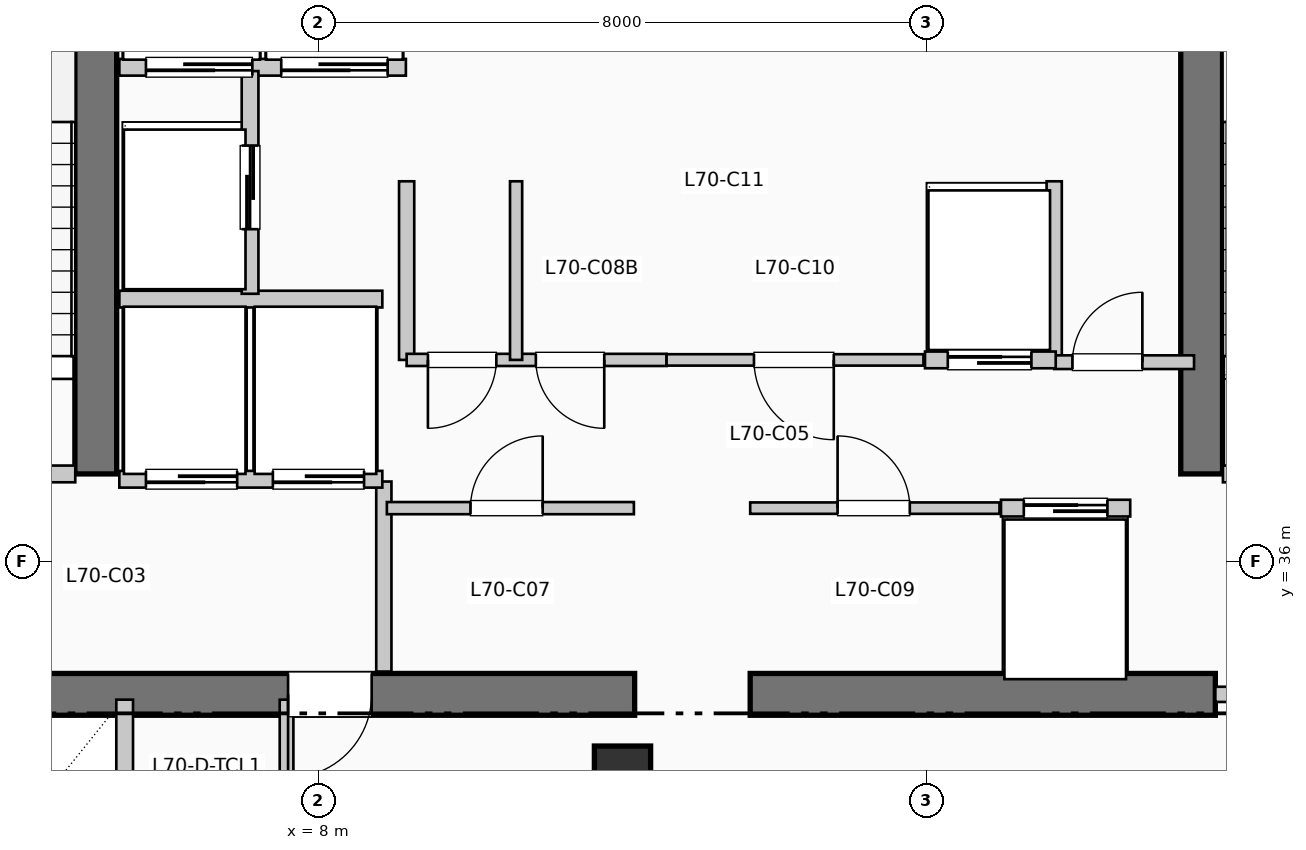
"""IFC4 building model, lengths in metres.
Left out: names, types, materials, properties, quantities, classifications, styles, units other than length and angle.
Written with IfcOpenShell. Run it as: python <this file> out.ifc"""

import sys

from ifc_helpers import new_model, si_unit, direction, frame, frame_2d, origin, origin_2d, place, context, subcontext, project, spatial, rectangle, extrude, element, fill, save


model = new_model("IFC4")
c1 = context("Model", 3, precision=1e-05, world=origin(), true_north=direction((0.0, 1.0)))
c2 = subcontext(c1, "Body", "Model", "MODEL_VIEW")
j1 = project(units=[si_unit("LENGTHUNIT", "METRE"), si_unit("PLANEANGLEUNIT", "RADIAN")], contexts=[c1])
p1 = place(None, origin())
s1 = spatial("IfcSite", under=j1, at=p1, CompositionType="ELEMENT")
p2 = place(p1, origin())
s2 = spatial("IfcBuilding", under=s1, at=p2, CompositionType="ELEMENT")
p3 = place(p2, frame((0.0, 0.0, 288.09)))
s3 = spatial("IfcBuildingStorey", under=s2, at=p3, CompositionType="ELEMENT", Elevation=288.09)
p4 = place(p3, frame((1.45, 34.25, 0.0), z_axis=(0.0, 0.0, 1.0), x_axis=(1.0, 0.0, 0.0)))
e1 = element("IfcWall", 1, at=p4, inside=s3, PredefinedType="SHEAR", context=c2, shape_type="SweptSolid", body=[
    extrude(rectangle(XDim=10.71, YDim=0.55, at=frame_2d((5.355, 0.0))), origin(), (0.0, 0.0, 1.0), 3.96),
])
p5 = place(p4, frame((7.25, 0.0, 0.0), z_axis=(0.0, 0.0, 1.0), x_axis=(-1.0, 0.0, 0.0)))
e2 = element("IfcOpeningElement", 2, at=p5, cuts=e1, PredefinedType="OPENING", context=c2, shape_type="SweptSolid", body=[
    extrude(rectangle(XDim=1.1, YDim=2.15, at=frame_2d((0.55, 1.075))), frame((0.0, 0.285, 0.0), z_axis=(0.0, -1.0, 0.0), x_axis=(1.0, 0.0, 0.0)), (0.0, 0.0, 1.0), 0.57),
])
p6 = place(p3, frame((13.68, 34.25, 0.0), z_axis=(0.0, 0.0, 1.0), x_axis=(1.0, 0.0, 0.0)))
e3 = element("IfcWall", 3, at=p6, inside=s3, PredefinedType="SHEAR", context=c2, shape_type="SweptSolid", body=[
    extrude(rectangle(XDim=6.12, YDim=0.55, at=frame_2d((3.06, 0.0))), origin(), (0.0, 0.0, 1.0), 3.96),
])
for number, where, z_axis, x_axis in (
    (4, (5.07, 37.15, 0.0), (0.0, 0.0, 1.0), (0.0, 1.0, 0.0)),
    (5, (19.62, 37.15, 0.0), (0.0, 0.0, 1.0), (0.0, 1.0, 0.0)),
):
    element("IfcWall", number, at=place(p3, frame(where, z_axis=z_axis, x_axis=x_axis)), inside=s3, PredefinedType="SHEAR", context=c2, shape_type="SweptSolid", body=[
        extrude(rectangle(XDim=7.89, YDim=0.55, at=frame_2d((3.945, 0.0))), origin(), (0.0, 0.0, 1.0), 3.96),
    ])
p7 = place(p3, frame((12.0, 33.2, 0.0), z_axis=(0.0, 0.0, 1.0), x_axis=(1.0, 0.0, 0.0)))
e6 = element("IfcColumn", 6, at=p7, inside=s3, PredefinedType="COLUMN", context=c2, shape_type="SweptSolid", body=[
    extrude(rectangle(XDim=0.74, YDim=0.74, at=origin_2d()), origin(), (0.0, 0.0, 1.0), 3.96),
])
p8 = place(p3, frame((1.65, 37.15, 0.0), z_axis=(0.0, 0.0, 1.0), x_axis=(1.0, 0.0, 0.0)))
e7 = element("IfcWall", 7, at=p8, inside=s3, PredefinedType="PARTITIONING", context=c2, shape_type="SweptSolid", body=[
    extrude(rectangle(XDim=3.15, YDim=0.22, at=frame_2d((1.575, 0.0))), origin(), (0.0, 0.0, 1.0), 3.74),
])
p9 = place(p8, frame((2.05, 0.0, 0.0), z_axis=(0.0, 0.0, 1.0), x_axis=(-1.0, 0.0, 0.0)))
e8 = element("IfcOpeningElement", 8, at=p9, cuts=e7, PredefinedType="OPENING", context=c2, shape_type="SweptSolid", body=[
    extrude(rectangle(XDim=1.05, YDim=2.15, at=frame_2d((0.525, 1.075))), frame((0.0, 0.12, 0.0), z_axis=(0.0, -1.0, 0.0), x_axis=(1.0, 0.0, 0.0)), (0.0, 0.0, 1.0), 0.24),
])
p10 = place(p3, frame((8.86, 34.55, 0.0), z_axis=(0.0, 0.0, 1.0), x_axis=(0.0, 1.0, 0.0)))
e9 = element("IfcWall", 9, at=p10, inside=s3, PredefinedType="PARTITIONING", context=c2, shape_type="SweptSolid", body=[
    extrude(rectangle(XDim=2.5, YDim=0.2, at=frame_2d((1.25, 0.0))), origin(), (0.0, 0.0, 1.0), 3.74),
])
p11 = place(p3, frame((19.9, 37.15, 0.0), z_axis=(0.0, 0.0, 1.0), x_axis=(1.0, 0.0, 0.0)))
e10 = element("IfcWall", 10, at=p11, inside=s3, PredefinedType="PARTITIONING", context=c2, shape_type="SweptSolid", body=[
    extrude(rectangle(XDim=3.15, YDim=0.22, at=frame_2d((1.575, 0.0))), origin(), (0.0, 0.0, 1.0), 3.74),
])
p12 = place(p11, frame((2.05, 0.0, 0.0), z_axis=(0.0, 0.0, 1.0), x_axis=(-1.0, 0.0, 0.0)))
e11 = element("IfcOpeningElement", 11, at=p12, cuts=e10, PredefinedType="OPENING", context=c2, shape_type="SweptSolid", body=[
    extrude(rectangle(XDim=1.05, YDim=2.15, at=frame_2d((0.525, 1.075))), frame((0.0, 0.12, 0.0), z_axis=(0.0, -1.0, 0.0), x_axis=(1.0, 0.0, 0.0)), (0.0, 0.0, 1.0), 0.24),
])
p13 = place(p3, frame((19.8, 34.25, 0.0), z_axis=(0.0, 0.0, 1.0), x_axis=(1.0, 0.0, 0.0)))
e12 = element("IfcWall", 12, at=p13, inside=s3, PredefinedType="PARTITIONING", context=c2, shape_type="SweptSolid", body=[
    extrude(rectangle(XDim=3.25, YDim=0.2, at=frame_2d((1.625, 0.0))), origin(), (0.0, 0.0, 1.0), 3.74),
])
p14 = place(p13, frame((2.15, 0.0, 0.0), z_axis=(0.0, 0.0, 1.0), x_axis=(-1.0, 0.0, 0.0)))
e13 = element("IfcOpeningElement", 13, at=p14, cuts=e12, PredefinedType="OPENING", context=c2, shape_type="SweptSolid", body=[
    extrude(rectangle(XDim=1.1, YDim=2.15, at=frame_2d((0.55, 1.075))), frame((0.0, 0.11, 0.0), z_axis=(0.0, -1.0, 0.0), x_axis=(1.0, 0.0, 0.0)), (0.0, 0.0, 1.0), 0.22),
])
p15 = place(p3, frame((5.38, 37.08, 0.0), z_axis=(0.0, 0.0, 1.0), x_axis=(1.0, 0.0, 0.0)))
e14 = element("IfcWall", 14, at=p15, inside=s3, PredefinedType="PARTITIONING", context=c2, shape_type="SweptSolid", body=[
    extrude(rectangle(XDim=3.46, YDim=0.22, at=frame_2d((1.73, 0.0))), origin(), (0.0, 0.0, 1.0), 3.74),
])
p16 = place(p15, frame((1.55, 0.0, 0.0), z_axis=(0.0, 0.0, 1.0), x_axis=(-1.0, 0.0, 0.0)))
e15 = element("IfcOpeningElement", 15, at=p16, cuts=e14, PredefinedType="OPENING", context=c2, shape_type="SweptSolid", body=[
    extrude(rectangle(XDim=1.2, YDim=2.2, at=frame_2d((0.6, 1.1))), frame((0.0, 0.12, 0.0), z_axis=(0.0, -1.0, 0.0), x_axis=(1.0, 0.0, 0.0)), (0.0, 0.0, 1.0), 0.24),
])
p17 = place(p15, frame((3.22, 0.0, 0.0), z_axis=(0.0, 0.0, 1.0), x_axis=(-1.0, 0.0, 0.0)))
e16 = element("IfcOpeningElement", 16, at=p17, cuts=e14, PredefinedType="OPENING", context=c2, shape_type="SweptSolid", body=[
    extrude(rectangle(XDim=1.2, YDim=2.2, at=frame_2d((0.6, 1.1))), frame((0.0, 0.12, 0.0), z_axis=(0.0, -1.0, 0.0), x_axis=(1.0, 0.0, 0.0)), (0.0, 0.0, 1.0), 0.24),
])
p18 = place(p3, frame((5.38, 39.45, 0.0), z_axis=(0.0, 0.0, 1.0), x_axis=(1.0, 0.0, 0.0)))
e17 = element("IfcWall", 17, at=p18, inside=s3, PredefinedType="PARTITIONING", context=c2, shape_type="SweptSolid", body=[
    extrude(rectangle(XDim=3.46, YDim=0.22, at=frame_2d((1.73, 0.0))), origin(), (0.0, 0.0, 1.0), 3.74),
])
p19 = place(p3, frame((5.38, 42.5, 0.0), z_axis=(0.0, 0.0, 1.0), x_axis=(1.0, 0.0, 0.0)))
e18 = element("IfcWall", 18, at=p19, inside=s3, PredefinedType="PARTITIONING", context=c2, shape_type="SweptSolid", body=[
    extrude(rectangle(XDim=3.77, YDim=0.22, at=frame_2d((1.885, 0.0))), origin(), (0.0, 0.0, 1.0), 3.74),
])
p20 = place(p19, frame((1.75, 0.0, 0.0), z_axis=(0.0, 0.0, 1.0), x_axis=(-1.0, 0.0, 0.0)))
e19 = element("IfcOpeningElement", 19, at=p20, cuts=e18, PredefinedType="OPENING", context=c2, shape_type="SweptSolid", body=[
    extrude(rectangle(XDim=1.4, YDim=2.2, at=frame_2d((0.7, 1.1))), frame((0.0, 0.12, 0.0), z_axis=(0.0, -1.0, 0.0), x_axis=(1.0, 0.0, 0.0)), (0.0, 0.0, 1.0), 0.24),
])
p21 = place(p19, frame((3.53, 0.0, 0.0), z_axis=(0.0, 0.0, 1.0), x_axis=(-1.0, 0.0, 0.0)))
e20 = element("IfcOpeningElement", 20, at=p21, cuts=e18, PredefinedType="OPENING", context=c2, shape_type="SweptSolid", body=[
    extrude(rectangle(XDim=1.4, YDim=2.2, at=frame_2d((0.7, 1.1))), frame((0.0, 0.12, 0.0), z_axis=(0.0, -1.0, 0.0), x_axis=(1.0, 0.0, 0.0)), (0.0, 0.0, 1.0), 0.24),
])
p22 = place(p3, frame((7.1, 39.52, 0.0), z_axis=(0.0, 0.0, 1.0), x_axis=(0.0, 1.0, 0.0)))
e21 = element("IfcWall", 21, at=p22, inside=s3, PredefinedType="PARTITIONING", context=c2, shape_type="SweptSolid", body=[
    extrude(rectangle(XDim=2.93, YDim=0.22, at=frame_2d((1.465, 0.0))), origin(), (0.0, 0.0, 1.0), 3.74),
])
p23 = place(p22, frame((0.85, 0.0, 0.0)))
e22 = element("IfcOpeningElement", 22, at=p23, cuts=e21, PredefinedType="OPENING", context=c2, shape_type="SweptSolid", body=[
    extrude(rectangle(XDim=1.1, YDim=2.2, at=frame_2d((0.55, 1.1))), frame((0.0, 0.12, 0.0), z_axis=(0.0, -1.0, 0.0), x_axis=(1.0, 0.0, 0.0)), (0.0, 0.0, 1.0), 0.24),
])
p24 = place(p3, frame((5.45, 31.8, 0.0), z_axis=(0.0, 0.0, 1.0), x_axis=(0.0, 1.0, 0.0)))
e23 = element("IfcWall", 23, at=p24, inside=s3, PredefinedType="PARTITIONING", context=c2, shape_type="SweptSolid", body=[
    extrude(rectangle(XDim=2.38, YDim=0.22, at=frame_2d((1.19, 0.0))), origin(), (0.0, 0.0, 1.0), 3.74),
])
for number, where, z_axis, x_axis in (
    (24, (9.16, 38.65, 0.0), (0.0, 0.0, 1.0), (0.0, 1.0, 0.0)),
    (25, (17.68, 38.65, 0.0), (0.0, 0.0, 1.0), (0.0, 1.0, 0.0)),
):
    element("IfcWall", number, at=place(p3, frame(where, z_axis=z_axis, x_axis=x_axis)), inside=s3, PredefinedType="PARTITIONING", context=c2, shape_type="SweptSolid", body=[
        extrude(rectangle(XDim=2.35, YDim=0.2, at=frame_2d((1.175, 0.0))), origin(), (0.0, 0.0, 1.0), 3.74),
    ])
p25 = place(p3, frame((17.68, 38.62, 0.0), z_axis=(0.0, 0.0, 1.0), x_axis=(1.0, 0.0, 0.0)))
e26 = element("IfcWall", 26, at=p25, inside=s3, PredefinedType="PARTITIONING", context=c2, shape_type="SweptSolid", body=[
    extrude(rectangle(XDim=1.84, YDim=0.18, at=frame_2d((0.92, 0.0))), origin(), (0.0, 0.0, 1.0), 3.74),
])
p26 = place(p25, frame((0.24, 0.0, 0.0)))
e27 = element("IfcOpeningElement", 27, at=p26, cuts=e26, PredefinedType="OPENING", context=c2, shape_type="SweptSolid", body=[
    extrude(rectangle(XDim=0.92, YDim=2.1, at=frame_2d((0.46, 1.05))), frame((0.0, 0.1, 0.0), z_axis=(0.0, -1.0, 0.0), x_axis=(1.0, 0.0, 0.0)), (0.0, 0.0, 1.0), 0.2),
])
p27 = place(p3, frame((7.58, 31.82, 0.0), z_axis=(0.0, 0.0, 1.0), x_axis=(0.0, 1.0, 0.0)))
e28 = element("IfcWall", 28, at=p27, inside=s3, PredefinedType="PLUMBINGWALL", context=c2, shape_type="SweptSolid", body=[
    extrude(rectangle(XDim=2.36, YDim=0.18, at=frame_2d((1.18, 0.0))), origin(), (0.0, 0.0, 1.0), 3.74),
])
p28 = place(p3, frame((8.9, 36.7, 0.0), z_axis=(0.0, 0.0, 1.0), x_axis=(1.0, 0.0, 0.0)))
e29 = element("IfcWall", 29, at=p28, inside=s3, PredefinedType="PARTITIONING", context=c2, shape_type="SweptSolid", body=[
    extrude(rectangle(XDim=3.25, YDim=0.16, at=frame_2d((1.625, 0.0))), origin(), (0.0, 0.0, 1.0), 3.74),
])
p29 = place(p28, frame((1.1, 0.0, 0.0)))
e30 = element("IfcOpeningElement", 30, at=p29, cuts=e29, PredefinedType="OPENING", context=c2, shape_type="SweptSolid", body=[
    extrude(rectangle(XDim=0.95, YDim=2.15, at=frame_2d((0.475, 1.075))), frame((0.0, 0.09, 0.0), z_axis=(0.0, -1.0, 0.0), x_axis=(1.0, 0.0, 0.0)), (0.0, 0.0, 1.0), 0.18),
])
p30 = place(p3, frame((9.16, 38.65, 0.0), z_axis=(0.0, 0.0, 1.0), x_axis=(1.0, 0.0, 0.0)))
e31 = element("IfcWall", 31, at=p30, inside=s3, PredefinedType="PARTITIONING", context=c2, shape_type="SweptSolid", body=[
    extrude(rectangle(XDim=3.42, YDim=0.16, at=frame_2d((1.71, 0.0))), origin(), (0.0, 0.0, 1.0), 3.74),
])
p31 = place(p30, frame((1.18, 0.0, 0.0), z_axis=(0.0, 0.0, 1.0), x_axis=(-1.0, 0.0, 0.0)))
e32 = element("IfcOpeningElement", 32, at=p31, cuts=e31, PredefinedType="OPENING", context=c2, shape_type="SweptSolid", body=[
    extrude(rectangle(XDim=0.9, YDim=2.15, at=frame_2d((0.45, 1.075))), frame((0.0, 0.09, 0.0), z_axis=(0.0, -1.0, 0.0), x_axis=(1.0, 0.0, 0.0)), (0.0, 0.0, 1.0), 0.18),
])
p32 = place(p30, frame((2.6, 0.0, 0.0), z_axis=(0.0, 0.0, 1.0), x_axis=(-1.0, 0.0, 0.0)))
e33 = element("IfcOpeningElement", 33, at=p32, cuts=e31, PredefinedType="OPENING", context=c2, shape_type="SweptSolid", body=[
    extrude(rectangle(XDim=0.9, YDim=2.15, at=frame_2d((0.45, 1.075))), frame((0.0, 0.09, 0.0), z_axis=(0.0, -1.0, 0.0), x_axis=(1.0, 0.0, 0.0)), (0.0, 0.0, 1.0), 0.18),
])
p33 = place(p3, frame((10.6, 38.65, 0.0), z_axis=(0.0, 0.0, 1.0), x_axis=(0.0, 1.0, 0.0)))
e34 = element("IfcWall", 34, at=p33, inside=s3, PredefinedType="PARTITIONING", context=c2, shape_type="SweptSolid", body=[
    extrude(rectangle(XDim=2.35, YDim=0.16, at=frame_2d((1.175, 0.0))), origin(), (0.0, 0.0, 1.0), 3.74),
])
p34 = place(p3, frame((13.68, 36.7, 0.0), z_axis=(0.0, 0.0, 1.0), x_axis=(1.0, 0.0, 0.0)))
e35 = element("IfcWall", 35, at=p34, inside=s3, PredefinedType="PARTITIONING", context=c2, shape_type="SweptSolid", body=[
    extrude(rectangle(XDim=3.28, YDim=0.15, at=frame_2d((1.64, 0.0))), origin(), (0.0, 0.0, 1.0), 3.74),
])
p35 = place(p34, frame((1.15, 0.0, 0.0)))
e36 = element("IfcOpeningElement", 36, at=p35, cuts=e35, PredefinedType="OPENING", context=c2, shape_type="SweptSolid", body=[
    extrude(rectangle(XDim=0.95, YDim=2.15, at=frame_2d((0.475, 1.075))), frame((0.0, 0.085, 0.0), z_axis=(0.0, -1.0, 0.0), x_axis=(1.0, 0.0, 0.0)), (0.0, 0.0, 1.0), 0.17),
])
p36 = place(p3, frame((12.58, 38.65, 0.0), z_axis=(0.0, 0.0, 1.0), x_axis=(1.0, 0.0, 0.0)))
e37 = element("IfcWall", 37, at=p36, inside=s3, PredefinedType="PARTITIONING", context=c2, shape_type="SweptSolid", body=[
    extrude(rectangle(XDim=3.38, YDim=0.15, at=frame_2d((1.69, 0.0))), origin(), (0.0, 0.0, 1.0), 3.74),
])
p37 = place(p36, frame((2.2, 0.0, 0.0), z_axis=(0.0, 0.0, 1.0), x_axis=(-1.0, 0.0, 0.0)))
e38 = element("IfcOpeningElement", 38, at=p37, cuts=e37, PredefinedType="OPENING", context=c2, shape_type="SweptSolid", body=[
    extrude(rectangle(XDim=1.05, YDim=2.15, at=frame_2d((0.525, 1.075))), frame((0.0, 0.085, 0.0), z_axis=(0.0, -1.0, 0.0), x_axis=(1.0, 0.0, 0.0)), (0.0, 0.0, 1.0), 0.17),
])
p38 = place(p3, frame((16.98, 36.7, 0.0), z_axis=(0.0, 0.0, 1.0), x_axis=(1.0, 0.0, 0.0)))
e39 = element("IfcWall", 39, at=p38, inside=s3, PredefinedType="PARTITIONING", context=c2, shape_type="SweptSolid", body=[
    extrude(rectangle(XDim=1.7, YDim=0.22, at=frame_2d((0.85, 0.0))), origin(), (0.0, 0.0, 1.0), 3.74),
])
p39 = place(p38, frame((0.3, 0.0, 0.0)))
e40 = element("IfcOpeningElement", 40, at=p39, cuts=e39, PredefinedType="OPENING", context=c2, shape_type="SweptSolid", body=[
    extrude(rectangle(XDim=1.1, YDim=2.2, at=frame_2d((0.55, 1.1))), frame((0.0, 0.12, 0.0), z_axis=(0.0, -1.0, 0.0), x_axis=(1.0, 0.0, 0.0)), (0.0, 0.0, 1.0), 0.24),
])
p40 = place(p3, frame((15.98, 38.65, 0.0), z_axis=(0.0, 0.0, 1.0), x_axis=(1.0, 0.0, 0.0)))
e41 = element("IfcWall", 41, at=p40, inside=s3, PredefinedType="PARTITIONING", context=c2, shape_type="SweptSolid", body=[
    extrude(rectangle(XDim=1.72, YDim=0.22, at=frame_2d((0.86, 0.0))), origin(), (0.0, 0.0, 1.0), 3.74),
])
p41 = place(p40, frame((0.3, 0.0, 0.0)))
e42 = element("IfcOpeningElement", 42, at=p41, cuts=e41, PredefinedType="OPENING", context=c2, shape_type="SweptSolid", body=[
    extrude(rectangle(XDim=1.1, YDim=2.2, at=frame_2d((0.55, 1.1))), frame((0.0, 0.12, 0.0), z_axis=(0.0, -1.0, 0.0), x_axis=(1.0, 0.0, 0.0)), (0.0, 0.0, 1.0), 0.24),
])
p42 = place(p5, origin())
e43 = element("IfcDoor", 43, at=p42, inside=s3, OperationType="SINGLE_SWING_LEFT", PredefinedType="DOOR", context=c2, shape_type="SweptSolid", body=[
    extrude(rectangle(XDim=1.1, YDim=2.15, at=frame_2d((0.55, 1.075))), frame((0.0, 0.025, 0.0), z_axis=(0.0, -1.0, 0.0), x_axis=(1.0, 0.0, 0.0)), (0.0, 0.0, 1.0), 0.05),
])
fill(e2, e43)
p43 = place(p16, origin())
e44 = element("IfcDoor", 44, at=p43, inside=s3, OperationType="SLIDING_TO_RIGHT", PredefinedType="DOOR", context=c2, shape_type="SweptSolid", body=[
    extrude(rectangle(XDim=1.2, YDim=2.2, at=frame_2d((0.6, 1.1))), frame((0.0, 0.025, 0.0), z_axis=(0.0, -1.0, 0.0), x_axis=(1.0, 0.0, 0.0)), (0.0, 0.0, 1.0), 0.05),
])
fill(e15, e44)
p44 = place(p17, origin())
e45 = element("IfcDoor", 45, at=p44, inside=s3, OperationType="SLIDING_TO_RIGHT", PredefinedType="DOOR", context=c2, shape_type="SweptSolid", body=[
    extrude(rectangle(XDim=1.2, YDim=2.2, at=frame_2d((0.6, 1.1))), frame((0.0, 0.025, 0.0), z_axis=(0.0, -1.0, 0.0), x_axis=(1.0, 0.0, 0.0)), (0.0, 0.0, 1.0), 0.05),
])
fill(e16, e45)
p45 = place(p20, origin())
e46 = element("IfcDoor", 46, at=p45, inside=s3, OperationType="SLIDING_TO_LEFT", PredefinedType="DOOR", context=c2, shape_type="SweptSolid", body=[
    extrude(rectangle(XDim=1.4, YDim=2.2, at=frame_2d((0.7, 1.1))), frame((0.0, 0.025, 0.0), z_axis=(0.0, -1.0, 0.0), x_axis=(1.0, 0.0, 0.0)), (0.0, 0.0, 1.0), 0.05),
])
fill(e19, e46)
p46 = place(p21, origin())
e47 = element("IfcDoor", 47, at=p46, inside=s3, OperationType="SLIDING_TO_LEFT", PredefinedType="DOOR", context=c2, shape_type="SweptSolid", body=[
    extrude(rectangle(XDim=1.4, YDim=2.2, at=frame_2d((0.7, 1.1))), frame((0.0, 0.025, 0.0), z_axis=(0.0, -1.0, 0.0), x_axis=(1.0, 0.0, 0.0)), (0.0, 0.0, 1.0), 0.05),
])
fill(e20, e47)
p47 = place(p23, origin())
e48 = element("IfcDoor", 48, at=p47, inside=s3, OperationType="SLIDING_TO_LEFT", PredefinedType="DOOR", context=c2, shape_type="SweptSolid", body=[
    extrude(rectangle(XDim=1.1, YDim=2.2, at=frame_2d((0.55, 1.1))), frame((0.0, 0.025, 0.0), z_axis=(0.0, -1.0, 0.0), x_axis=(1.0, 0.0, 0.0)), (0.0, 0.0, 1.0), 0.05),
])
fill(e22, e48)
p48 = place(p26, origin())
e49 = element("IfcDoor", 49, at=p48, inside=s3, OperationType="SINGLE_SWING_RIGHT", PredefinedType="DOOR", context=c2, shape_type="SweptSolid", body=[
    extrude(rectangle(XDim=0.92, YDim=2.1, at=frame_2d((0.46, 1.05))), frame((0.0, 0.025, 0.0), z_axis=(0.0, -1.0, 0.0), x_axis=(1.0, 0.0, 0.0)), (0.0, 0.0, 1.0), 0.05),
])
fill(e27, e49)
p49 = place(p29, origin())
e50 = element("IfcDoor", 50, at=p49, inside=s3, OperationType="SINGLE_SWING_RIGHT", PredefinedType="DOOR", context=c2, shape_type="SweptSolid", body=[
    extrude(rectangle(XDim=0.95, YDim=2.15, at=frame_2d((0.475, 1.075))), frame((0.0, 0.025, 0.0), z_axis=(0.0, -1.0, 0.0), x_axis=(1.0, 0.0, 0.0)), (0.0, 0.0, 1.0), 0.05),
])
fill(e30, e50)
p50 = place(p31, origin())
e51 = element("IfcDoor", 51, at=p50, inside=s3, OperationType="SINGLE_SWING_LEFT", PredefinedType="DOOR", context=c2, shape_type="SweptSolid", body=[
    extrude(rectangle(XDim=0.9, YDim=2.15, at=frame_2d((0.45, 1.075))), frame((0.0, 0.025, 0.0), z_axis=(0.0, -1.0, 0.0), x_axis=(1.0, 0.0, 0.0)), (0.0, 0.0, 1.0), 0.05),
])
fill(e32, e51)
p51 = place(p32, origin())
e52 = element("IfcDoor", 52, at=p51, inside=s3, OperationType="SINGLE_SWING_RIGHT", PredefinedType="DOOR", context=c2, shape_type="SweptSolid", body=[
    extrude(rectangle(XDim=0.9, YDim=2.15, at=frame_2d((0.45, 1.075))), frame((0.0, 0.025, 0.0), z_axis=(0.0, -1.0, 0.0), x_axis=(1.0, 0.0, 0.0)), (0.0, 0.0, 1.0), 0.05),
])
fill(e33, e52)
p52 = place(p35, origin())
e53 = element("IfcDoor", 53, at=p52, inside=s3, OperationType="SINGLE_SWING_LEFT", PredefinedType="DOOR", context=c2, shape_type="SweptSolid", body=[
    extrude(rectangle(XDim=0.95, YDim=2.15, at=frame_2d((0.475, 1.075))), frame((0.0, 0.025, 0.0), z_axis=(0.0, -1.0, 0.0), x_axis=(1.0, 0.0, 0.0)), (0.0, 0.0, 1.0), 0.05),
])
fill(e36, e53)
p53 = place(p37, origin())
e54 = element("IfcDoor", 54, at=p53, inside=s3, OperationType="SINGLE_SWING_RIGHT", PredefinedType="DOOR", context=c2, shape_type="SweptSolid", body=[
    extrude(rectangle(XDim=1.05, YDim=2.15, at=frame_2d((0.525, 1.075))), frame((0.0, 0.025, 0.0), z_axis=(0.0, -1.0, 0.0), x_axis=(1.0, 0.0, 0.0)), (0.0, 0.0, 1.0), 0.05),
])
fill(e38, e54)
p54 = place(p39, origin())
e55 = element("IfcDoor", 55, at=p54, inside=s3, OperationType="SLIDING_TO_LEFT", PredefinedType="DOOR", context=c2, shape_type="SweptSolid", body=[
    extrude(rectangle(XDim=1.1, YDim=2.2, at=frame_2d((0.55, 1.1))), frame((0.0, 0.025, 0.0), z_axis=(0.0, -1.0, 0.0), x_axis=(1.0, 0.0, 0.0)), (0.0, 0.0, 1.0), 0.05),
])
fill(e40, e55)
p55 = place(p41, origin())
e56 = element("IfcDoor", 56, at=p55, inside=s3, OperationType="SLIDING_TO_LEFT", PredefinedType="DOOR", context=c2, shape_type="SweptSolid", body=[
    extrude(rectangle(XDim=1.1, YDim=2.2, at=frame_2d((0.55, 1.1))), frame((0.0, 0.025, 0.0), z_axis=(0.0, -1.0, 0.0), x_axis=(1.0, 0.0, 0.0)), (0.0, 0.0, 1.0), 0.05),
])
fill(e42, e56)
save(model, sys.argv[1])
